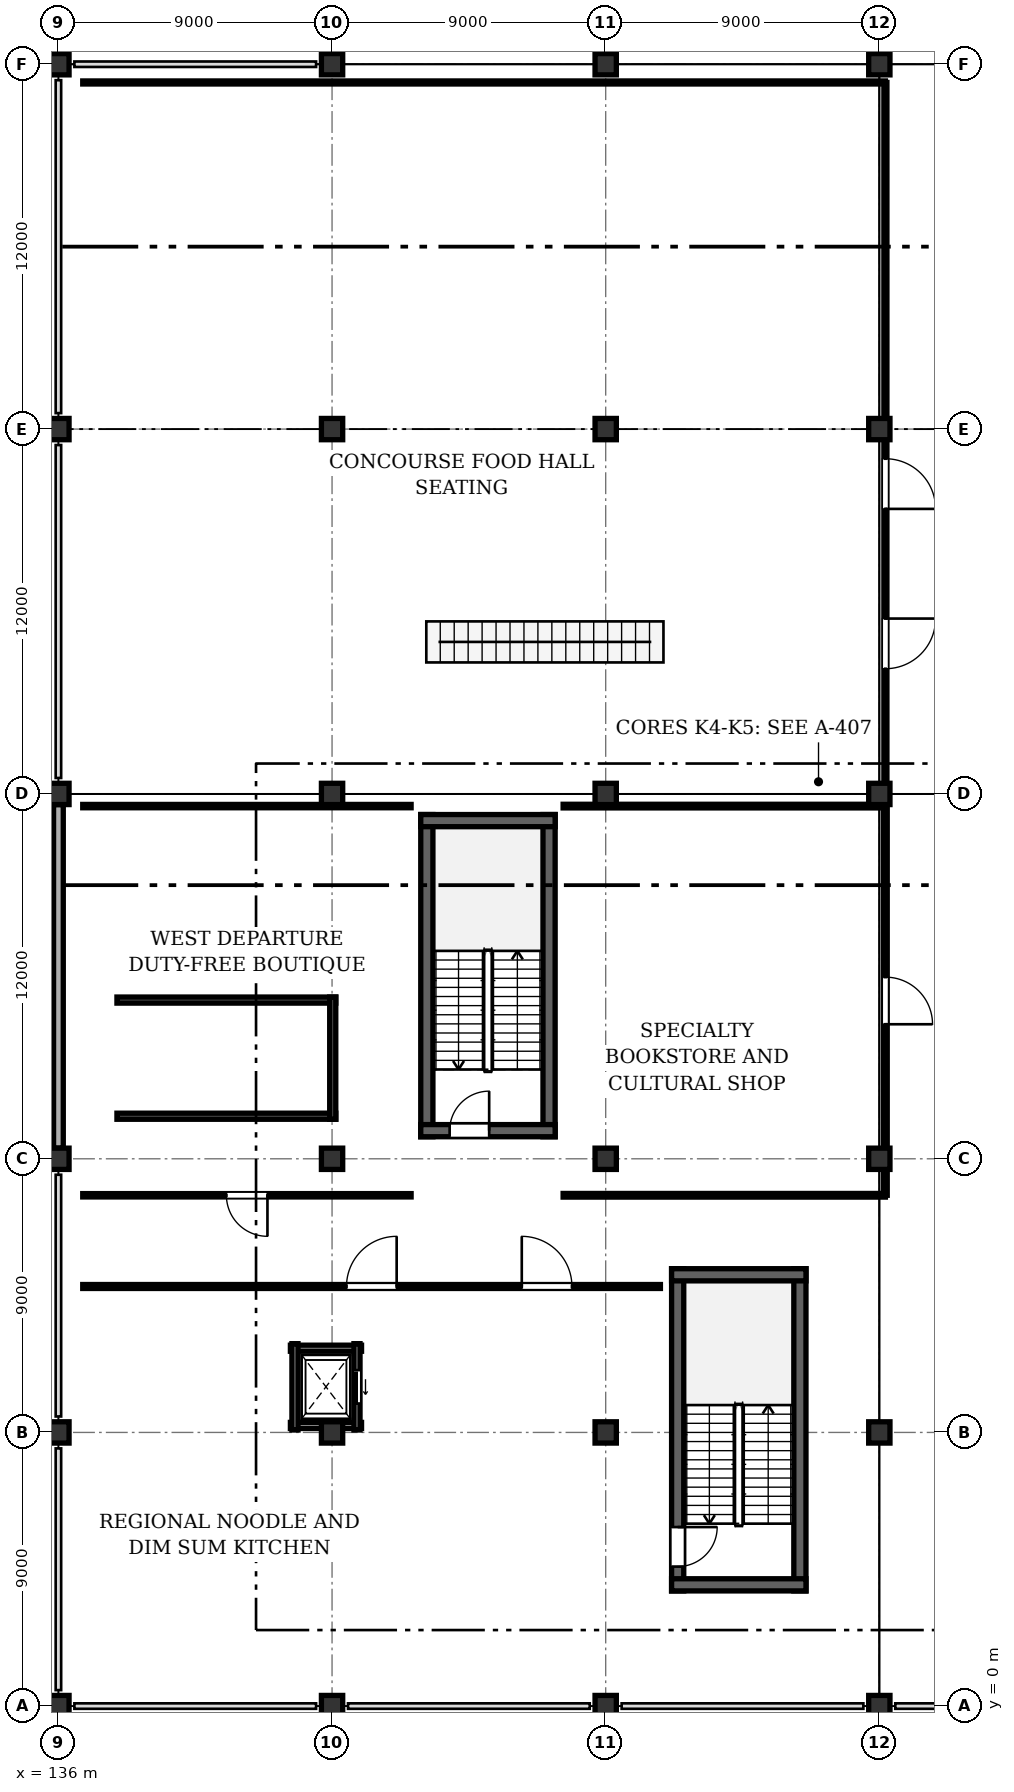
"""IFC4 building model, lengths in metres.
Left out: names, types, materials, properties, quantities, classifications, styles, units other than length and angle.
Written with IfcOpenShell. Run it as: python <this file> out.ifc"""

import sys

from ifc_helpers import new_model, si_unit, direction, frame, frame_2d, origin, origin_2d, place, context, subcontext, project, spatial, rectangle, extrude, element, fill, save


model = new_model("IFC4")
c1 = context("Model", 3, precision=1e-05, world=origin(), true_north=direction((0.0, 1.0)))
c2 = subcontext(c1, "Body", "Model", "MODEL_VIEW")
j1 = project(units=[si_unit("LENGTHUNIT", "METRE"), si_unit("PLANEANGLEUNIT", "RADIAN")], contexts=[c1])
p1 = place(None, origin())
s1 = spatial("IfcSite", under=j1, at=p1, CompositionType="ELEMENT")
p2 = place(p1, origin())
s2 = spatial("IfcBuilding", under=s1, at=p2, CompositionType="ELEMENT")
p3 = place(p2, frame((0.0, 0.0, 6.6)))
s3 = spatial("IfcBuildingStorey", under=s2, at=p3, CompositionType="ELEMENT", Elevation=6.6)
for number, where, z_axis, x_axis in (
    (1, (136.0, 0.0, 0.0), (0.0, 0.0, 1.0), (1.0, 0.0, 0.0)),
    (2, (136.0, 9.0, 0.0), (0.0, 0.0, 1.0), (1.0, 0.0, 0.0)),
    (3, (136.0, 18.0, 0.0), (0.0, 0.0, 1.0), (1.0, 0.0, 0.0)),
    (4, (136.0, 30.0, 0.0), (0.0, 0.0, 1.0), (1.0, 0.0, 0.0)),
    (5, (136.0, 42.0, 0.0), (0.0, 0.0, 1.0), (1.0, 0.0, 0.0)),
    (6, (136.0, 54.0, 0.0), (0.0, 0.0, 1.0), (1.0, 0.0, 0.0)),
    (7, (145.0, 0.0, 0.0), (0.0, 0.0, 1.0), (1.0, 0.0, 0.0)),
    (8, (145.0, 9.0, 0.0), (0.0, 0.0, 1.0), (1.0, 0.0, 0.0)),
    (9, (145.0, 18.0, 0.0), (0.0, 0.0, 1.0), (1.0, 0.0, 0.0)),
    (10, (145.0, 30.0, 0.0), (0.0, 0.0, 1.0), (1.0, 0.0, 0.0)),
    (11, (145.0, 42.0, 0.0), (0.0, 0.0, 1.0), (1.0, 0.0, 0.0)),
    (12, (145.0, 54.0, 0.0), (0.0, 0.0, 1.0), (1.0, 0.0, 0.0)),
    (13, (154.0, 0.0, 0.0), (0.0, 0.0, 1.0), (1.0, 0.0, 0.0)),
    (14, (154.0, 9.0, 0.0), (0.0, 0.0, 1.0), (1.0, 0.0, 0.0)),
    (15, (154.0, 18.0, 0.0), (0.0, 0.0, 1.0), (1.0, 0.0, 0.0)),
    (16, (154.0, 30.0, 0.0), (0.0, 0.0, 1.0), (1.0, 0.0, 0.0)),
    (17, (154.0, 42.0, 0.0), (0.0, 0.0, 1.0), (1.0, 0.0, 0.0)),
    (18, (154.0, 54.0, 0.0), (0.0, 0.0, 1.0), (1.0, 0.0, 0.0)),
    (19, (163.0, 0.0, 0.0), (0.0, 0.0, 1.0), (1.0, 0.0, 0.0)),
    (20, (163.0, 9.0, 0.0), (0.0, 0.0, 1.0), (1.0, 0.0, 0.0)),
    (21, (163.0, 18.0, 0.0), (0.0, 0.0, 1.0), (1.0, 0.0, 0.0)),
    (22, (163.0, 30.0, 0.0), (0.0, 0.0, 1.0), (1.0, 0.0, 0.0)),
    (23, (163.0, 42.0, 0.0), (0.0, 0.0, 1.0), (1.0, 0.0, 0.0)),
    (24, (163.0, 54.0, 0.0), (0.0, 0.0, 1.0), (1.0, 0.0, 0.0)),
):
    element("IfcColumn", number, at=place(p3, frame(where, z_axis=z_axis, x_axis=x_axis)), inside=s3, PredefinedType="COLUMN", context=c2, shape_type="SweptSolid", body=[
        extrude(rectangle(XDim=0.7, YDim=0.7, at=origin_2d()), origin(), (0.0, 0.0, 1.0), 4.2),
    ])
p4 = place(p3, frame((136.0, 18.35, 0.0), z_axis=(0.0, 0.0, 1.0), x_axis=(0.0, 1.0, 0.0)))
e25 = element("IfcWall", 25, at=p4, inside=s3, PredefinedType="SOLIDWALL", context=c2, shape_type="SweptSolid", body=[
    extrude(rectangle(XDim=11.3, YDim=0.32, at=frame_2d((5.65, 0.0))), origin(), (0.0, 0.0, 1.0), 3.385),
])
p5 = place(p3, frame((136.15, 54.15, 0.0), z_axis=(0.0, 0.0, 1.0), x_axis=(0.0, 1.0, 0.0)))
e26 = element("IfcWall", 26, at=p5, inside=s3, PredefinedType="PARAPET", context=c2, shape_type="SweptSolid", body=[
    extrude(rectangle(XDim=49.2, YDim=0.18, at=frame_2d((24.6, 0.0))), origin(), (0.0, 0.0, 1.0), 1.2),
])
for number, where, z_axis, x_axis in (
    (27, (152.137, 18.725, 0.0), (0.0, 0.0, 1.0), (0.0, 1.0, 0.0)),
    (28, (148.117, 29.323, 0.0), (0.0, 0.0, 1.0), (0.0, -1.0, 0.0)),
):
    element("IfcWall", number, at=place(p3, frame(where, z_axis=z_axis, x_axis=x_axis)), inside=s3, PredefinedType="SHEAR", context=c2, shape_type="SweptSolid", body=[
        extrude(rectangle(XDim=10.597, YDim=0.4, at=frame_2d((5.299, 0.0))), origin(), (0.0, 0.0, 1.0), 3.96),
    ])
p6 = place(p3, frame((152.337, 29.123, 0.0), z_axis=(0.0, 0.0, 1.0), x_axis=(-1.0, 0.0, 0.0)))
e29 = element("IfcWall", 29, at=p6, inside=s3, PredefinedType="SHEAR", context=c2, shape_type="SweptSolid", body=[
    extrude(rectangle(XDim=4.42, YDim=0.4, at=frame_2d((2.21, 0.0))), origin(), (0.0, 0.0, 1.0), 3.96),
])
p7 = place(p3, frame((147.917, 18.925, 0.0), z_axis=(0.0, 0.0, 1.0), x_axis=(1.0, 0.0, 0.0)))
e30 = element("IfcWall", 30, at=p7, inside=s3, PredefinedType="SHEAR", context=c2, shape_type="SweptSolid", body=[
    extrude(rectangle(XDim=4.42, YDim=0.4, at=frame_2d((2.21, 0.0))), origin(), (0.0, 0.0, 1.0), 3.96),
])
p8 = place(p7, frame((0.95, 0.0, 0.0)))
e31 = element("IfcOpeningElement", 31, at=p8, cuts=e30, PredefinedType="OPENING", context=c2, shape_type="SweptSolid", body=[
    extrude(rectangle(XDim=1.3, YDim=2.1, at=frame_2d((0.65, 1.05))), frame((0.0, 0.21, 0.0), z_axis=(0.0, -1.0, 0.0), x_axis=(1.0, 0.0, 0.0)), (0.0, 0.0, 1.0), 0.42),
])
p9 = place(p3, frame((160.387, 3.788, 0.0), z_axis=(0.0, 0.0, 1.0), x_axis=(0.0, 1.0, 0.0)))
e32 = element("IfcWall", 32, at=p9, inside=s3, PredefinedType="SHEAR", context=c2, shape_type="SweptSolid", body=[
    extrude(rectangle(XDim=10.597, YDim=0.4, at=frame_2d((5.299, 0.0))), origin(), (0.0, 0.0, 1.0), 3.96),
])
p10 = place(p3, frame((156.367, 14.385, 0.0), z_axis=(0.0, 0.0, 1.0), x_axis=(0.0, -1.0, 0.0)))
e33 = element("IfcWall", 33, at=p10, inside=s3, PredefinedType="SHEAR", context=c2, shape_type="SweptSolid", body=[
    extrude(rectangle(XDim=10.597, YDim=0.4, at=frame_2d((5.299, 0.0))), origin(), (0.0, 0.0, 1.0), 3.96),
])
p11 = place(p10, frame((8.498, 0.0, 0.0)))
e34 = element("IfcOpeningElement", 34, at=p11, cuts=e33, PredefinedType="OPENING", context=c2, shape_type="SweptSolid", body=[
    extrude(rectangle(XDim=1.3, YDim=2.1, at=frame_2d((0.65, 1.05))), frame((0.0, 0.21, 0.0), z_axis=(0.0, -1.0, 0.0), x_axis=(1.0, 0.0, 0.0)), (0.0, 0.0, 1.0), 0.42),
])
for number, where, z_axis, x_axis in (
    (35, (160.587, 14.185, 0.0), (0.0, 0.0, 1.0), (-1.0, 0.0, 0.0)),
    (36, (156.167, 3.988, 0.0), (0.0, 0.0, 1.0), (1.0, 0.0, 0.0)),
):
    element("IfcWall", number, at=place(p3, frame(where, z_axis=z_axis, x_axis=x_axis)), inside=s3, PredefinedType="SHEAR", context=c2, shape_type="SweptSolid", body=[
        extrude(rectangle(XDim=4.42, YDim=0.4, at=frame_2d((2.21, 0.0))), origin(), (0.0, 0.0, 1.0), 3.96),
    ])
for number, where, z_axis, x_axis in (
    (37, (137.925, 19.4, 0.0), (0.0, 0.0, 1.0), (1.0, 0.0, 0.0)),
    (38, (145.123, 23.22, 0.0), (0.0, 0.0, 1.0), (-1.0, 0.0, 0.0)),
):
    element("IfcWall", number, at=place(p3, frame(where, z_axis=z_axis, x_axis=x_axis)), inside=s3, PredefinedType="SOLIDWALL", context=c2, shape_type="SweptSolid", body=[
        extrude(rectangle(XDim=7.198, YDim=0.2, at=frame_2d((3.599, 0.0))), origin(), (0.0, 0.0, 1.0), 3.96),
    ])
p12 = place(p3, frame((145.022, 19.3, 0.0), z_axis=(0.0, 0.0, 1.0), x_axis=(0.0, 1.0, 0.0)))
e39 = element("IfcWall", 39, at=p12, inside=s3, PredefinedType="SOLIDWALL", context=c2, shape_type="SweptSolid", body=[
    extrude(rectangle(XDim=4.02, YDim=0.2, at=frame_2d((2.01, 0.0))), origin(), (0.0, 0.0, 1.0), 3.96),
])
p13 = place(p3, frame((143.63, 9.23, 0.0), z_axis=(0.0, 0.0, 1.0), x_axis=(1.0, 0.0, 0.0)))
e40 = element("IfcWall", 40, at=p13, inside=s3, PredefinedType="SOLIDWALL", context=c2, shape_type="SweptSolid", body=[
    extrude(rectangle(XDim=2.34, YDim=0.2, at=frame_2d((1.17, 0.0))), origin(), (0.0, 0.0, 1.0), 3.495),
])
p14 = place(p3, frame((145.97, 11.77, 0.0), z_axis=(0.0, 0.0, 1.0), x_axis=(-1.0, 0.0, 0.0)))
e41 = element("IfcWall", 41, at=p14, inside=s3, PredefinedType="SOLIDWALL", context=c2, shape_type="SweptSolid", body=[
    extrude(rectangle(XDim=2.34, YDim=0.2, at=frame_2d((1.17, 0.0))), origin(), (0.0, 0.0, 1.0), 3.935),
])
p15 = place(p3, frame((143.78, 11.92, 0.0), z_axis=(0.0, 0.0, 1.0), x_axis=(0.0, -1.0, 0.0)))
e42 = element("IfcWall", 42, at=p15, inside=s3, PredefinedType="SOLIDWALL", context=c2, shape_type="SweptSolid", body=[
    extrude(rectangle(XDim=2.84, YDim=0.2, at=frame_2d((1.42, 0.0))), origin(), (0.0, 0.0, 1.0), 3.495),
])
p16 = place(p3, frame((145.82, 9.08, 0.0), z_axis=(0.0, 0.0, 1.0), x_axis=(0.0, 1.0, 0.0)))
e43 = element("IfcWall", 43, at=p16, inside=s3, PredefinedType="SOLIDWALL", context=c2, shape_type="SweptSolid", body=[
    extrude(rectangle(XDim=2.84, YDim=0.2, at=frame_2d((1.42, 0.0))), origin(), (0.0, 0.0, 1.0), 3.495),
])
p17 = place(p16, frame((0.87, 0.0, 0.0)))
e44 = element("IfcOpeningElement", 44, at=p17, cuts=e43, PredefinedType="OPENING", context=c2, shape_type="SweptSolid", body=[
    extrude(rectangle(XDim=1.1, YDim=2.15, at=frame_2d((0.55, 1.075))), frame((0.0, 0.11, 0.0), z_axis=(0.0, -1.0, 0.0), x_axis=(1.0, 0.0, 0.0)), (0.0, 0.0, 1.0), 0.22),
])
p18 = place(p3, frame((136.8, 13.8, 0.0), z_axis=(0.0, 0.0, 1.0), x_axis=(1.0, 0.0, 0.0)))
e45 = element("IfcWall", 45, at=p18, inside=s3, PredefinedType="PARTITIONING", context=c2, shape_type="SweptSolid", body=[
    extrude(rectangle(XDim=19.0, YDim=0.13, at=frame_2d((9.5, 0.0))), origin(), (0.0, 0.0, 1.0), 3.545),
])
p19 = place(p18, frame((8.675, 0.0, 0.0)))
e46 = element("IfcOpeningElement", 46, at=p19, cuts=e45, PredefinedType="OPENING", context=c2, shape_type="SweptSolid", body=[
    extrude(rectangle(XDim=1.65, YDim=2.1, at=frame_2d((0.825, 1.05))), frame((0.0, 0.075, 0.0), z_axis=(0.0, -1.0, 0.0), x_axis=(1.0, 0.0, 0.0)), (0.0, 0.0, 1.0), 0.15),
])
p20 = place(p18, frame((14.44, 0.0, 0.0)))
e47 = element("IfcOpeningElement", 47, at=p20, cuts=e45, PredefinedType="OPENING", context=c2, shape_type="SweptSolid", body=[
    extrude(rectangle(XDim=1.65, YDim=2.1, at=frame_2d((0.825, 1.05))), frame((0.0, 0.075, 0.0), z_axis=(0.0, -1.0, 0.0), x_axis=(1.0, 0.0, 0.0)), (0.0, 0.0, 1.0), 0.15),
])
p21 = place(p3, frame((163.2, 16.8, 0.0), z_axis=(0.0, 0.0, 1.0), x_axis=(-1.0, 0.0, 0.0)))
e48 = element("IfcWall", 48, at=p21, inside=s3, PredefinedType="PARTITIONING", context=c2, shape_type="SweptSolid", body=[
    extrude(rectangle(XDim=10.6, YDim=0.12, at=frame_2d((5.3, 0.0))), origin(), (0.0, 0.0, 1.0), 3.545),
])
p22 = place(p3, frame((152.6, 29.6, 0.0), z_axis=(0.0, 0.0, 1.0), x_axis=(1.0, 0.0, 0.0)))
e49 = element("IfcWall", 49, at=p22, inside=s3, PredefinedType="PARTITIONING", context=c2, shape_type="SweptSolid", body=[
    extrude(rectangle(XDim=10.6, YDim=0.12, at=frame_2d((5.3, 0.0))), origin(), (0.0, 0.0, 1.0), 3.385),
])
p23 = place(p3, frame((163.2, 29.6, 0.0), z_axis=(0.0, 0.0, 1.0), x_axis=(0.0, -1.0, 0.0)))
e50 = element("IfcWall", 50, at=p23, inside=s3, PredefinedType="PARTITIONING", context=c2, shape_type="SweptSolid", body=[
    extrude(rectangle(XDim=12.8, YDim=0.12, at=frame_2d((6.4, 0.0))), origin(), (0.0, 0.0, 1.0), 3.385),
])
p24 = place(p23, frame((5.625, 0.0, 0.0)))
e51 = element("IfcOpeningElement", 51, at=p24, cuts=e50, PredefinedType="OPENING", context=c2, shape_type="SweptSolid", body=[
    extrude(rectangle(XDim=1.55, YDim=2.1, at=frame_2d((0.775, 1.05))), frame((0.0, 0.07, 0.0), z_axis=(0.0, -1.0, 0.0), x_axis=(1.0, 0.0, 0.0)), (0.0, 0.0, 1.0), 0.14),
])
p25 = place(p3, frame((147.6, 16.8, 0.0), z_axis=(0.0, 0.0, 1.0), x_axis=(-1.0, 0.0, 0.0)))
e52 = element("IfcWall", 52, at=p25, inside=s3, PredefinedType="PARTITIONING", context=c2, shape_type="SweptSolid", body=[
    extrude(rectangle(XDim=10.8, YDim=0.11, at=frame_2d((5.4, 0.0))), origin(), (0.0, 0.0, 1.0), 3.545),
])
p26 = place(p25, frame((4.725, 0.0, 0.0)))
e53 = element("IfcOpeningElement", 53, at=p26, cuts=e52, PredefinedType="OPENING", context=c2, shape_type="SweptSolid", body=[
    extrude(rectangle(XDim=1.35, YDim=2.1, at=frame_2d((0.675, 1.05))), frame((0.0, 0.065, 0.0), z_axis=(0.0, -1.0, 0.0), x_axis=(1.0, 0.0, 0.0)), (0.0, 0.0, 1.0), 0.13),
])
p27 = place(p3, frame((136.8, 29.6, 0.0), z_axis=(0.0, 0.0, 1.0), x_axis=(1.0, 0.0, 0.0)))
e54 = element("IfcWall", 54, at=p27, inside=s3, PredefinedType="PARTITIONING", context=c2, shape_type="SweptSolid", body=[
    extrude(rectangle(XDim=10.8, YDim=0.11, at=frame_2d((5.4, 0.0))), origin(), (0.0, 0.0, 1.0), 3.385),
])
p28 = place(p3, frame((136.8, 53.4, 0.0), z_axis=(0.0, 0.0, 1.0), x_axis=(1.0, 0.0, 0.0)))
e55 = element("IfcWall", 55, at=p28, inside=s3, PredefinedType="PARTITIONING", context=c2, shape_type="SweptSolid", body=[
    extrude(rectangle(XDim=26.4, YDim=0.1, at=frame_2d((13.2, 0.0))), origin(), (0.0, 0.0, 1.0), 3.37),
])
p29 = place(p3, frame((163.2, 53.4, 0.0), z_axis=(0.0, 0.0, 1.0), x_axis=(0.0, -1.0, 0.0)))
e56 = element("IfcWall", 56, at=p29, inside=s3, PredefinedType="PARTITIONING", context=c2, shape_type="SweptSolid", body=[
    extrude(rectangle(XDim=23.2, YDim=0.1, at=frame_2d((11.6, 0.0))), origin(), (0.0, 0.0, 1.0), 3.37),
])
p30 = place(p29, frame((12.375, 0.0, 0.0)))
e57 = element("IfcOpeningElement", 57, at=p30, cuts=e56, PredefinedType="OPENING", context=c2, shape_type="SweptSolid", body=[
    extrude(rectangle(XDim=1.65, YDim=2.1, at=frame_2d((0.825, 1.05))), frame((0.0, 0.06, 0.0), z_axis=(0.0, -1.0, 0.0), x_axis=(1.0, 0.0, 0.0)), (0.0, 0.0, 1.0), 0.12),
])
p31 = place(p29, frame((17.632, 0.0, 0.0)))
e58 = element("IfcOpeningElement", 58, at=p31, cuts=e56, PredefinedType="OPENING", context=c2, shape_type="SweptSolid", body=[
    extrude(rectangle(XDim=1.65, YDim=2.1, at=frame_2d((0.825, 1.05))), frame((0.0, 0.06, 0.0), z_axis=(0.0, -1.0, 0.0), x_axis=(1.0, 0.0, 0.0)), (0.0, 0.0, 1.0), 0.12),
])
p32 = place(p8, origin())
e59 = element("IfcDoor", 59, at=p32, inside=s3, OperationType="SINGLE_SWING_RIGHT", PredefinedType="DOOR", context=c2, shape_type="SweptSolid", body=[
    extrude(rectangle(XDim=1.3, YDim=2.1, at=frame_2d((0.65, 1.05))), frame((0.0, 0.025, 0.0), z_axis=(0.0, -1.0, 0.0), x_axis=(1.0, 0.0, 0.0)), (0.0, 0.0, 1.0), 0.05),
])
fill(e31, e59)
p33 = place(p11, origin())
e60 = element("IfcDoor", 60, at=p33, inside=s3, OperationType="SINGLE_SWING_LEFT", PredefinedType="DOOR", context=c2, shape_type="SweptSolid", body=[
    extrude(rectangle(XDim=1.3, YDim=2.1, at=frame_2d((0.65, 1.05))), frame((0.0, 0.025, 0.0), z_axis=(0.0, -1.0, 0.0), x_axis=(1.0, 0.0, 0.0)), (0.0, 0.0, 1.0), 0.05),
])
fill(e34, e60)
p34 = place(p17, origin())
e61 = element("IfcDoor", 61, at=p34, inside=s3, OperationType="SLIDING_TO_LEFT", PredefinedType="DOOR", context=c2, shape_type="SweptSolid", body=[
    extrude(rectangle(XDim=1.1, YDim=2.15, at=frame_2d((0.55, 1.075))), frame((0.0, 0.025, 0.0), z_axis=(0.0, -1.0, 0.0), x_axis=(1.0, 0.0, 0.0)), (0.0, 0.0, 1.0), 0.05),
])
fill(e44, e61)
p35 = place(p19, origin())
e62 = element("IfcDoor", 62, at=p35, inside=s3, OperationType="SINGLE_SWING_RIGHT", PredefinedType="DOOR", context=c2, shape_type="SweptSolid", body=[
    extrude(rectangle(XDim=1.65, YDim=2.1, at=frame_2d((0.825, 1.05))), frame((0.0, 0.025, 0.0), z_axis=(0.0, -1.0, 0.0), x_axis=(1.0, 0.0, 0.0)), (0.0, 0.0, 1.0), 0.05),
])
fill(e46, e62)
p36 = place(p20, origin())
e63 = element("IfcDoor", 63, at=p36, inside=s3, OperationType="SINGLE_SWING_LEFT", PredefinedType="DOOR", context=c2, shape_type="SweptSolid", body=[
    extrude(rectangle(XDim=1.65, YDim=2.1, at=frame_2d((0.825, 1.05))), frame((0.0, 0.025, 0.0), z_axis=(0.0, -1.0, 0.0), x_axis=(1.0, 0.0, 0.0)), (0.0, 0.0, 1.0), 0.05),
])
fill(e47, e63)
p37 = place(p24, origin())
e64 = element("IfcDoor", 64, at=p37, inside=s3, OperationType="SINGLE_SWING_RIGHT", PredefinedType="DOOR", context=c2, shape_type="SweptSolid", body=[
    extrude(rectangle(XDim=1.55, YDim=2.1, at=frame_2d((0.775, 1.05))), frame((0.0, 0.025, 0.0), z_axis=(0.0, -1.0, 0.0), x_axis=(1.0, 0.0, 0.0)), (0.0, 0.0, 1.0), 0.05),
])
fill(e51, e64)
p38 = place(p26, origin())
e65 = element("IfcDoor", 65, at=p38, inside=s3, OperationType="SINGLE_SWING_LEFT", PredefinedType="DOOR", context=c2, shape_type="SweptSolid", body=[
    extrude(rectangle(XDim=1.35, YDim=2.1, at=frame_2d((0.675, 1.05))), frame((0.0, 0.025, 0.0), z_axis=(0.0, -1.0, 0.0), x_axis=(1.0, 0.0, 0.0)), (0.0, 0.0, 1.0), 0.05),
])
fill(e53, e65)
p39 = place(p30, origin())
e66 = element("IfcDoor", 66, at=p39, inside=s3, OperationType="SINGLE_SWING_RIGHT", PredefinedType="DOOR", context=c2, shape_type="SweptSolid", body=[
    extrude(rectangle(XDim=1.65, YDim=2.1, at=frame_2d((0.825, 1.05))), frame((0.0, 0.025, 0.0), z_axis=(0.0, -1.0, 0.0), x_axis=(1.0, 0.0, 0.0)), (0.0, 0.0, 1.0), 0.05),
])
fill(e57, e66)
p40 = place(p31, origin())
e67 = element("IfcDoor", 67, at=p40, inside=s3, OperationType="SINGLE_SWING_LEFT", PredefinedType="DOOR", context=c2, shape_type="SweptSolid", body=[
    extrude(rectangle(XDim=1.65, YDim=2.1, at=frame_2d((0.825, 1.05))), frame((0.0, 0.025, 0.0), z_axis=(0.0, -1.0, 0.0), x_axis=(1.0, 0.0, 0.0)), (0.0, 0.0, 1.0), 0.05),
])
fill(e58, e67)
save(model, sys.argv[1])
